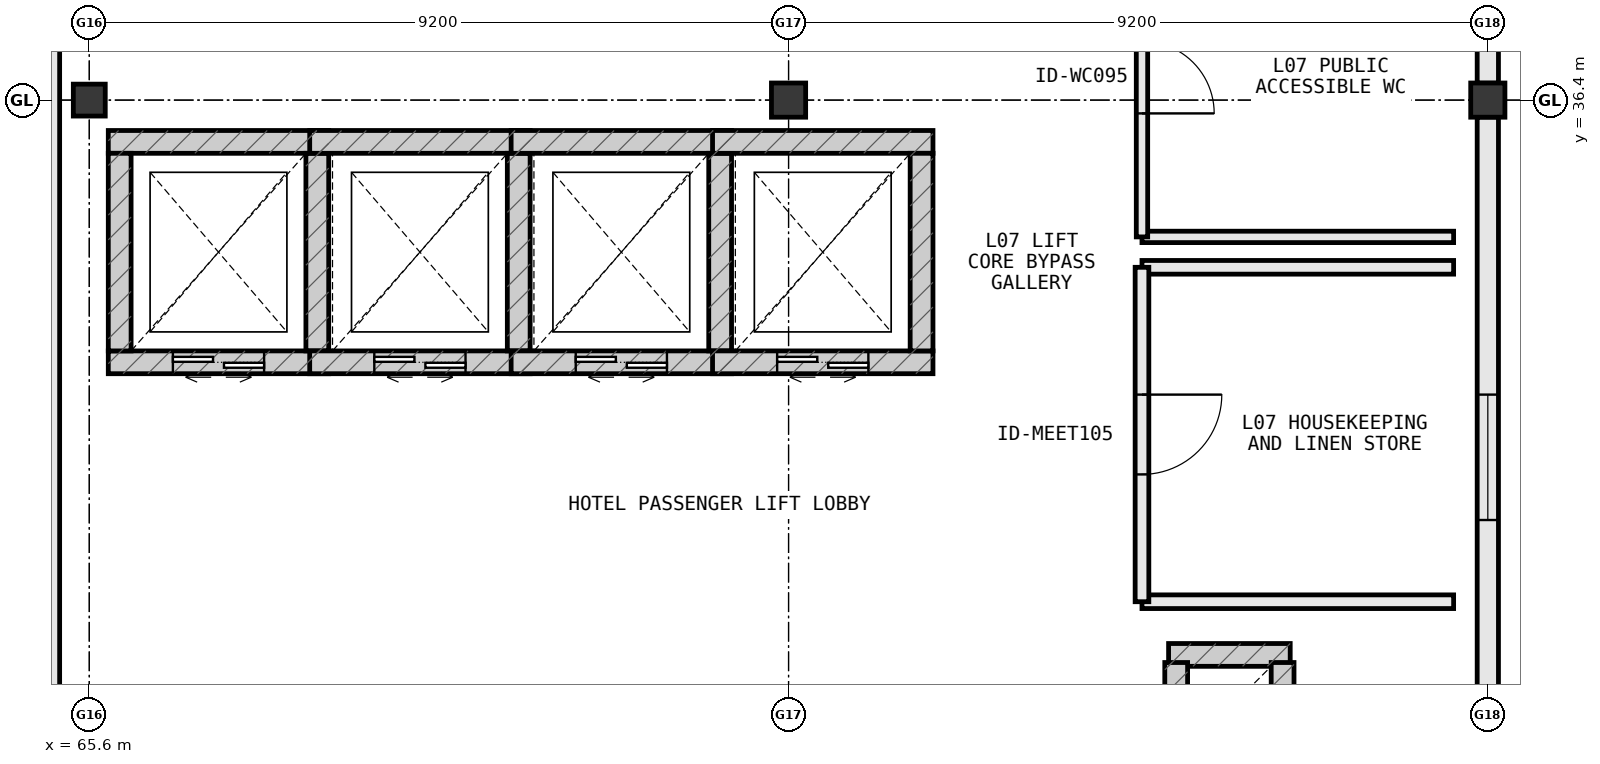
"""IFC4 building model, lengths in metres.
Left out: names, types, materials, properties, quantities, classifications, styles, units other than length and angle.
Written with IfcOpenShell. Run it as: python <this file> out.ifc"""

import sys

from ifc_helpers import new_model, si_unit, direction, frame, frame_2d, origin, origin_2d, place, context, subcontext, project, spatial, rectangle, extrude, element, fill, save


model = new_model("IFC4")
c1 = context("Model", 3, precision=1e-05, world=origin(), true_north=direction((0.0, 1.0)))
c2 = subcontext(c1, "Body", "Model", "MODEL_VIEW")
j1 = project(units=[si_unit("LENGTHUNIT", "METRE"), si_unit("PLANEANGLEUNIT", "RADIAN")], contexts=[c1])
p1 = place(None, origin())
s1 = spatial("IfcSite", under=j1, at=p1, CompositionType="ELEMENT")
p2 = place(p1, origin())
s2 = spatial("IfcBuilding", under=s1, at=p2, CompositionType="ELEMENT")
p3 = place(p2, frame((0.0, 0.0, 31.4)))
s3 = spatial("IfcBuildingStorey", under=s2, at=p3, CompositionType="ELEMENT", Elevation=31.4)
for number, where, z_axis, x_axis in (
    (1, (74.8, 36.4, 0.0), (0.0, 0.0, 1.0), (1.0, 0.0, 0.0)),
    (2, (84.0, 36.4, 0.0), (0.0, 0.0, 1.0), (1.0, 0.0, 0.0)),
):
    element("IfcColumn", number, at=place(p3, frame(where, z_axis=z_axis, x_axis=x_axis)), inside=s3, PredefinedType="COLUMN", context=c2, shape_type="SweptSolid", body=[
        extrude(rectangle(XDim=0.45, YDim=0.45, at=origin_2d()), origin(), (0.0, 0.0, 1.0), 3.8),
    ])
p4 = place(p3, frame((65.6, 36.4, 0.0), z_axis=(0.0, 0.0, 1.0), x_axis=(1.0, 0.0, 0.0)))
e3 = element("IfcColumn", 3, at=p4, inside=s3, PredefinedType="COLUMN", context=c2, shape_type="SweptSolid", body=[
    extrude(rectangle(XDim=0.42, YDim=0.42, at=origin_2d()), origin(), (0.0, 0.0, 1.0), 3.8),
])
p5 = place(p3, frame((81.4, 29.1, 0.0), z_axis=(0.0, 0.0, 1.0), x_axis=(-1.0, 0.0, 0.0)))
e4 = element("IfcWall", 4, at=p5, inside=s3, PredefinedType="SHEAR", context=c2, shape_type="SweptSolid", body=[
    extrude(rectangle(XDim=1.6, YDim=0.3, at=frame_2d((0.8, 0.0))), origin(), (0.0, 0.0, 1.0), 3.555),
])
for number, where, z_axis, x_axis in (
    (5, (79.9, 29.0, 0.0), (0.0, 0.0, 1.0), (0.0, -1.0, 0.0)),
    (6, (81.3, 27.8, 0.0), (0.0, 0.0, 1.0), (0.0, 1.0, 0.0)),
):
    element("IfcWall", number, at=place(p3, frame(where, z_axis=z_axis, x_axis=x_axis)), inside=s3, PredefinedType="SHEAR", context=c2, shape_type="SweptSolid", body=[
        extrude(rectangle(XDim=1.2, YDim=0.3, at=frame_2d((0.6, 0.0))), origin(), (0.0, 0.0, 1.0), 3.555),
    ])
p6 = place(p3, frame((84.0, 27.223, 0.0), z_axis=(0.0, 0.0, 1.0), x_axis=(0.0, 1.0, 0.0)))
e7 = element("IfcWall", 7, at=p6, inside=s3, PredefinedType="STANDARD", context=c2, shape_type="SweptSolid", body=[
    extrude(rectangle(XDim=8.954, YDim=0.28, at=frame_2d((4.477, 0.0))), origin(), (0.0, 0.0, 1.0), 2.97),
])
p7 = place(p6, frame((3.652, 0.0, 0.85)))
e8 = element("IfcOpeningElement", 8, at=p7, cuts=e7, PredefinedType="OPENING", context=c2, shape_type="SweptSolid", body=[
    extrude(rectangle(XDim=1.65, YDim=1.8, at=frame_2d((0.825, 0.9))), frame((0.0, 0.152, 0.0), z_axis=(0.0, -1.0, 0.0), x_axis=(1.0, 0.0, 0.0)), (0.0, 0.0, 1.0), 0.304),
])
p8 = place(p3, frame((84.0, 36.623, 0.0), z_axis=(0.0, 0.0, 1.0), x_axis=(0.0, 1.0, 0.0)))
e9 = element("IfcWall", 9, at=p8, inside=s3, PredefinedType="STANDARD", context=c2, shape_type="SweptSolid", body=[
    extrude(rectangle(XDim=10.354, YDim=0.28, at=frame_2d((5.177, 0.0))), origin(), (0.0, 0.0, 1.0), 2.97),
])
p9 = place(p8, frame((6.94, 0.0, 0.85)))
e10 = element("IfcOpeningElement", 10, at=p9, cuts=e9, PredefinedType="OPENING", context=c2, shape_type="SweptSolid", body=[
    extrude(rectangle(XDim=1.65, YDim=1.8, at=frame_2d((0.825, 0.9))), frame((0.0, 0.152, 0.0), z_axis=(0.0, -1.0, 0.0), x_axis=(1.0, 0.0, 0.0)), (0.0, 0.0, 1.0), 0.304),
])
p10 = place(p3, frame((65.85, 32.95, 0.0), z_axis=(0.0, 0.0, 1.0), x_axis=(1.0, 0.0, 0.0)))
e11 = element("IfcWall", 11, at=p10, inside=s3, PredefinedType="SHEAR", context=c2, shape_type="SweptSolid", body=[
    extrude(rectangle(XDim=2.9, YDim=0.3, at=frame_2d((1.45, 0.0))), origin(), (0.0, 0.0, 1.0), 3.8),
])
p11 = place(p10, frame((0.85, 0.0, 0.0)))
e12 = element("IfcOpeningElement", 12, at=p11, cuts=e11, PredefinedType="OPENING", context=c2, shape_type="SweptSolid", body=[
    extrude(rectangle(XDim=1.2, YDim=2.2, at=frame_2d((0.6, 1.1))), frame((0.0, 0.162, 0.0), z_axis=(0.0, -1.0, 0.0), x_axis=(1.0, 0.0, 0.0)), (0.0, 0.0, 1.0), 0.324),
])
p12 = place(p3, frame((68.75, 35.85, 0.0), z_axis=(0.0, 0.0, 1.0), x_axis=(-1.0, 0.0, 0.0)))
e13 = element("IfcWall", 13, at=p12, inside=s3, PredefinedType="SHEAR", context=c2, shape_type="SweptSolid", body=[
    extrude(rectangle(XDim=2.9, YDim=0.3, at=frame_2d((1.45, 0.0))), origin(), (0.0, 0.0, 1.0), 3.8),
])
for number, where, z_axis, x_axis in (
    (14, (68.6, 33.1, 0.0), (0.0, 0.0, 1.0), (0.0, 1.0, 0.0)),
    (15, (66.0, 35.7, 0.0), (0.0, 0.0, 1.0), (0.0, -1.0, 0.0)),
):
    element("IfcWall", number, at=place(p3, frame(where, z_axis=z_axis, x_axis=x_axis)), inside=s3, PredefinedType="SHEAR", context=c2, shape_type="SweptSolid", body=[
        extrude(rectangle(XDim=2.6, YDim=0.3, at=frame_2d((1.3, 0.0))), origin(), (0.0, 0.0, 1.0), 3.8),
    ])
p13 = place(p3, frame((68.5, 32.95, 0.0), z_axis=(0.0, 0.0, 1.0), x_axis=(1.0, 0.0, 0.0)))
e16 = element("IfcWall", 16, at=p13, inside=s3, PredefinedType="SHEAR", context=c2, shape_type="SweptSolid", body=[
    extrude(rectangle(XDim=2.9, YDim=0.3, at=frame_2d((1.45, 0.0))), origin(), (0.0, 0.0, 1.0), 3.8),
])
p14 = place(p13, frame((0.85, 0.0, 0.0)))
e17 = element("IfcOpeningElement", 17, at=p14, cuts=e16, PredefinedType="OPENING", context=c2, shape_type="SweptSolid", body=[
    extrude(rectangle(XDim=1.2, YDim=2.2, at=frame_2d((0.6, 1.1))), frame((0.0, 0.162, 0.0), z_axis=(0.0, -1.0, 0.0), x_axis=(1.0, 0.0, 0.0)), (0.0, 0.0, 1.0), 0.324),
])
p15 = place(p3, frame((71.4, 35.85, 0.0), z_axis=(0.0, 0.0, 1.0), x_axis=(-1.0, 0.0, 0.0)))
e18 = element("IfcWall", 18, at=p15, inside=s3, PredefinedType="SHEAR", context=c2, shape_type="SweptSolid", body=[
    extrude(rectangle(XDim=2.9, YDim=0.3, at=frame_2d((1.45, 0.0))), origin(), (0.0, 0.0, 1.0), 3.8),
])
p16 = place(p3, frame((71.25, 33.1, 0.0), z_axis=(0.0, 0.0, 1.0), x_axis=(0.0, 1.0, 0.0)))
e19 = element("IfcWall", 19, at=p16, inside=s3, PredefinedType="SHEAR", context=c2, shape_type="SweptSolid", body=[
    extrude(rectangle(XDim=2.6, YDim=0.3, at=frame_2d((1.3, 0.0))), origin(), (0.0, 0.0, 1.0), 3.8),
])
p17 = place(p3, frame((71.15, 32.95, 0.0), z_axis=(0.0, 0.0, 1.0), x_axis=(1.0, 0.0, 0.0)))
e20 = element("IfcWall", 20, at=p17, inside=s3, PredefinedType="SHEAR", context=c2, shape_type="SweptSolid", body=[
    extrude(rectangle(XDim=2.9, YDim=0.3, at=frame_2d((1.45, 0.0))), origin(), (0.0, 0.0, 1.0), 3.8),
])
p18 = place(p17, frame((0.85, 0.0, 0.0)))
e21 = element("IfcOpeningElement", 21, at=p18, cuts=e20, PredefinedType="OPENING", context=c2, shape_type="SweptSolid", body=[
    extrude(rectangle(XDim=1.2, YDim=2.2, at=frame_2d((0.6, 1.1))), frame((0.0, 0.162, 0.0), z_axis=(0.0, -1.0, 0.0), x_axis=(1.0, 0.0, 0.0)), (0.0, 0.0, 1.0), 0.324),
])
p19 = place(p3, frame((74.05, 35.85, 0.0), z_axis=(0.0, 0.0, 1.0), x_axis=(-1.0, 0.0, 0.0)))
e22 = element("IfcWall", 22, at=p19, inside=s3, PredefinedType="SHEAR", context=c2, shape_type="SweptSolid", body=[
    extrude(rectangle(XDim=2.9, YDim=0.3, at=frame_2d((1.45, 0.0))), origin(), (0.0, 0.0, 1.0), 3.8),
])
p20 = place(p3, frame((73.9, 33.1, 0.0), z_axis=(0.0, 0.0, 1.0), x_axis=(0.0, 1.0, 0.0)))
e23 = element("IfcWall", 23, at=p20, inside=s3, PredefinedType="SHEAR", context=c2, shape_type="SweptSolid", body=[
    extrude(rectangle(XDim=2.6, YDim=0.3, at=frame_2d((1.3, 0.0))), origin(), (0.0, 0.0, 1.0), 3.8),
])
p21 = place(p3, frame((73.8, 32.95, 0.0), z_axis=(0.0, 0.0, 1.0), x_axis=(1.0, 0.0, 0.0)))
e24 = element("IfcWall", 24, at=p21, inside=s3, PredefinedType="SHEAR", context=c2, shape_type="SweptSolid", body=[
    extrude(rectangle(XDim=2.9, YDim=0.3, at=frame_2d((1.45, 0.0))), origin(), (0.0, 0.0, 1.0), 3.8),
])
p22 = place(p21, frame((0.85, 0.0, 0.0)))
e25 = element("IfcOpeningElement", 25, at=p22, cuts=e24, PredefinedType="OPENING", context=c2, shape_type="SweptSolid", body=[
    extrude(rectangle(XDim=1.2, YDim=2.2, at=frame_2d((0.6, 1.1))), frame((0.0, 0.162, 0.0), z_axis=(0.0, -1.0, 0.0), x_axis=(1.0, 0.0, 0.0)), (0.0, 0.0, 1.0), 0.324),
])
p23 = place(p3, frame((76.7, 35.85, 0.0), z_axis=(0.0, 0.0, 1.0), x_axis=(-1.0, 0.0, 0.0)))
e26 = element("IfcWall", 26, at=p23, inside=s3, PredefinedType="SHEAR", context=c2, shape_type="SweptSolid", body=[
    extrude(rectangle(XDim=2.9, YDim=0.3, at=frame_2d((1.45, 0.0))), origin(), (0.0, 0.0, 1.0), 3.8),
])
p24 = place(p3, frame((76.55, 33.1, 0.0), z_axis=(0.0, 0.0, 1.0), x_axis=(0.0, 1.0, 0.0)))
e27 = element("IfcWall", 27, at=p24, inside=s3, PredefinedType="SHEAR", context=c2, shape_type="SweptSolid", body=[
    extrude(rectangle(XDim=2.6, YDim=0.3, at=frame_2d((1.3, 0.0))), origin(), (0.0, 0.0, 1.0), 3.8),
])
for number, where, z_axis, x_axis in (
    (28, (79.45, 29.8, 0.0), (0.0, 0.0, 1.0), (1.0, 0.0, 0.0)),
    (29, (83.55, 34.2, 0.0), (0.0, 0.0, 1.0), (-1.0, 0.0, 0.0)),
):
    element("IfcWall", number, at=place(p3, frame(where, z_axis=z_axis, x_axis=x_axis)), inside=s3, PredefinedType="PARTITIONING", context=c2, shape_type="SweptSolid", body=[
        extrude(rectangle(XDim=4.1, YDim=0.18, at=frame_2d((2.05, 0.0))), origin(), (0.0, 0.0, 1.0), 3.555),
    ])
p25 = place(p3, frame((79.45, 34.2, 0.0), z_axis=(0.0, 0.0, 1.0), x_axis=(0.0, -1.0, 0.0)))
e30 = element("IfcWall", 30, at=p25, inside=s3, PredefinedType="PARTITIONING", context=c2, shape_type="SweptSolid", body=[
    extrude(rectangle(XDim=4.4, YDim=0.18, at=frame_2d((2.2, 0.0))), origin(), (0.0, 0.0, 1.0), 3.555),
])
p26 = place(p25, frame((1.675, 0.0, 0.0)))
e31 = element("IfcOpeningElement", 31, at=p26, cuts=e30, PredefinedType="OPENING", context=c2, shape_type="SweptSolid", body=[
    extrude(rectangle(XDim=1.05, YDim=2.2, at=frame_2d((0.525, 1.1))), frame((0.0, 0.102, 0.0), z_axis=(0.0, -1.0, 0.0), x_axis=(1.0, 0.0, 0.0)), (0.0, 0.0, 1.0), 0.204),
])
p27 = place(p3, frame((79.45, 34.6, 0.0), z_axis=(0.0, 0.0, 1.0), x_axis=(1.0, 0.0, 0.0)))
e32 = element("IfcWall", 32, at=p27, inside=s3, PredefinedType="PLUMBINGWALL", context=c2, shape_type="SweptSolid", body=[
    extrude(rectangle(XDim=4.1, YDim=0.15, at=frame_2d((2.05, 0.0))), origin(), (0.0, 0.0, 1.0), 3.555),
])
p28 = place(p3, frame((79.45, 38.8, 0.0), z_axis=(0.0, 0.0, 1.0), x_axis=(0.0, -1.0, 0.0)))
e33 = element("IfcWall", 33, at=p28, inside=s3, PredefinedType="PLUMBINGWALL", context=c2, shape_type="SweptSolid", body=[
    extrude(rectangle(XDim=4.2, YDim=0.15, at=frame_2d((2.1, 0.0))), origin(), (0.0, 0.0, 1.0), 3.555),
])
p29 = place(p28, frame((1.625, 0.0, 0.0)))
e34 = element("IfcOpeningElement", 34, at=p29, cuts=e33, PredefinedType="OPENING", context=c2, shape_type="SweptSolid", body=[
    extrude(rectangle(XDim=0.95, YDim=2.15, at=frame_2d((0.475, 1.075))), frame((0.0, 0.087, 0.0), z_axis=(0.0, -1.0, 0.0), x_axis=(1.0, 0.0, 0.0)), (0.0, 0.0, 1.0), 0.174),
])
p30 = place(p3, frame((65.13, 27.16, 0.0), z_axis=(0.0, 0.0, 1.0), x_axis=(0.0, 1.0, 0.0)))
e35 = element("IfcWall", 35, at=p30, inside=s3, PredefinedType="PARTITIONING", context=c2, shape_type="SweptSolid", body=[
    extrude(rectangle(XDim=10.34, YDim=0.16, at=frame_2d((5.17, 0.0))), origin(), (0.0, 0.0, 1.0), 3.555),
])
p31 = place(p7, origin())
e36 = element("IfcWindow", 36, at=p31, inside=s3, PartitioningType="SINGLE_PANEL", PredefinedType="WINDOW", context=c2, shape_type="SweptSolid", body=[
    extrude(rectangle(XDim=1.65, YDim=1.8, at=frame_2d((0.825, 0.9))), frame((0.0, 0.03, 0.0), z_axis=(0.0, -1.0, 0.0), x_axis=(1.0, 0.0, 0.0)), (0.0, 0.0, 1.0), 0.06),
])
fill(e8, e36)
p32 = place(p11, origin())
e37 = element("IfcDoor", 37, at=p32, inside=s3, OperationType="DOUBLE_DOOR_SLIDING", PredefinedType="DOOR", context=c2, shape_type="SweptSolid", body=[
    extrude(rectangle(XDim=1.2, YDim=2.2, at=frame_2d((0.6, 1.1))), frame((0.0, 0.025, 0.0), z_axis=(0.0, -1.0, 0.0), x_axis=(1.0, 0.0, 0.0)), (0.0, 0.0, 1.0), 0.05),
])
fill(e12, e37)
p33 = place(p14, origin())
e38 = element("IfcDoor", 38, at=p33, inside=s3, OperationType="DOUBLE_DOOR_SLIDING", PredefinedType="DOOR", context=c2, shape_type="SweptSolid", body=[
    extrude(rectangle(XDim=1.2, YDim=2.2, at=frame_2d((0.6, 1.1))), frame((0.0, 0.025, 0.0), z_axis=(0.0, -1.0, 0.0), x_axis=(1.0, 0.0, 0.0)), (0.0, 0.0, 1.0), 0.05),
])
fill(e17, e38)
p34 = place(p18, origin())
e39 = element("IfcDoor", 39, at=p34, inside=s3, OperationType="DOUBLE_DOOR_SLIDING", PredefinedType="DOOR", context=c2, shape_type="SweptSolid", body=[
    extrude(rectangle(XDim=1.2, YDim=2.2, at=frame_2d((0.6, 1.1))), frame((0.0, 0.025, 0.0), z_axis=(0.0, -1.0, 0.0), x_axis=(1.0, 0.0, 0.0)), (0.0, 0.0, 1.0), 0.05),
])
fill(e21, e39)
p35 = place(p22, origin())
e40 = element("IfcDoor", 40, at=p35, inside=s3, OperationType="DOUBLE_DOOR_SLIDING", PredefinedType="DOOR", context=c2, shape_type="SweptSolid", body=[
    extrude(rectangle(XDim=1.2, YDim=2.2, at=frame_2d((0.6, 1.1))), frame((0.0, 0.025, 0.0), z_axis=(0.0, -1.0, 0.0), x_axis=(1.0, 0.0, 0.0)), (0.0, 0.0, 1.0), 0.05),
])
fill(e25, e40)
p36 = place(p26, origin())
e41 = element("IfcDoor", 41, at=p36, inside=s3, OperationType="SINGLE_SWING_LEFT", PredefinedType="DOOR", context=c2, shape_type="SweptSolid", body=[
    extrude(rectangle(XDim=1.05, YDim=2.2, at=frame_2d((0.525, 1.1))), frame((0.0, 0.025, 0.0), z_axis=(0.0, -1.0, 0.0), x_axis=(1.0, 0.0, 0.0)), (0.0, 0.0, 1.0), 0.05),
])
fill(e31, e41)
p37 = place(p29, origin())
e42 = element("IfcDoor", 42, at=p37, inside=s3, OperationType="SINGLE_SWING_RIGHT", PredefinedType="DOOR", context=c2, shape_type="SweptSolid", body=[
    extrude(rectangle(XDim=0.95, YDim=2.15, at=frame_2d((0.475, 1.075))), frame((0.0, 0.025, 0.0), z_axis=(0.0, -1.0, 0.0), x_axis=(1.0, 0.0, 0.0)), (0.0, 0.0, 1.0), 0.05),
])
fill(e34, e42)
save(model, sys.argv[1])
